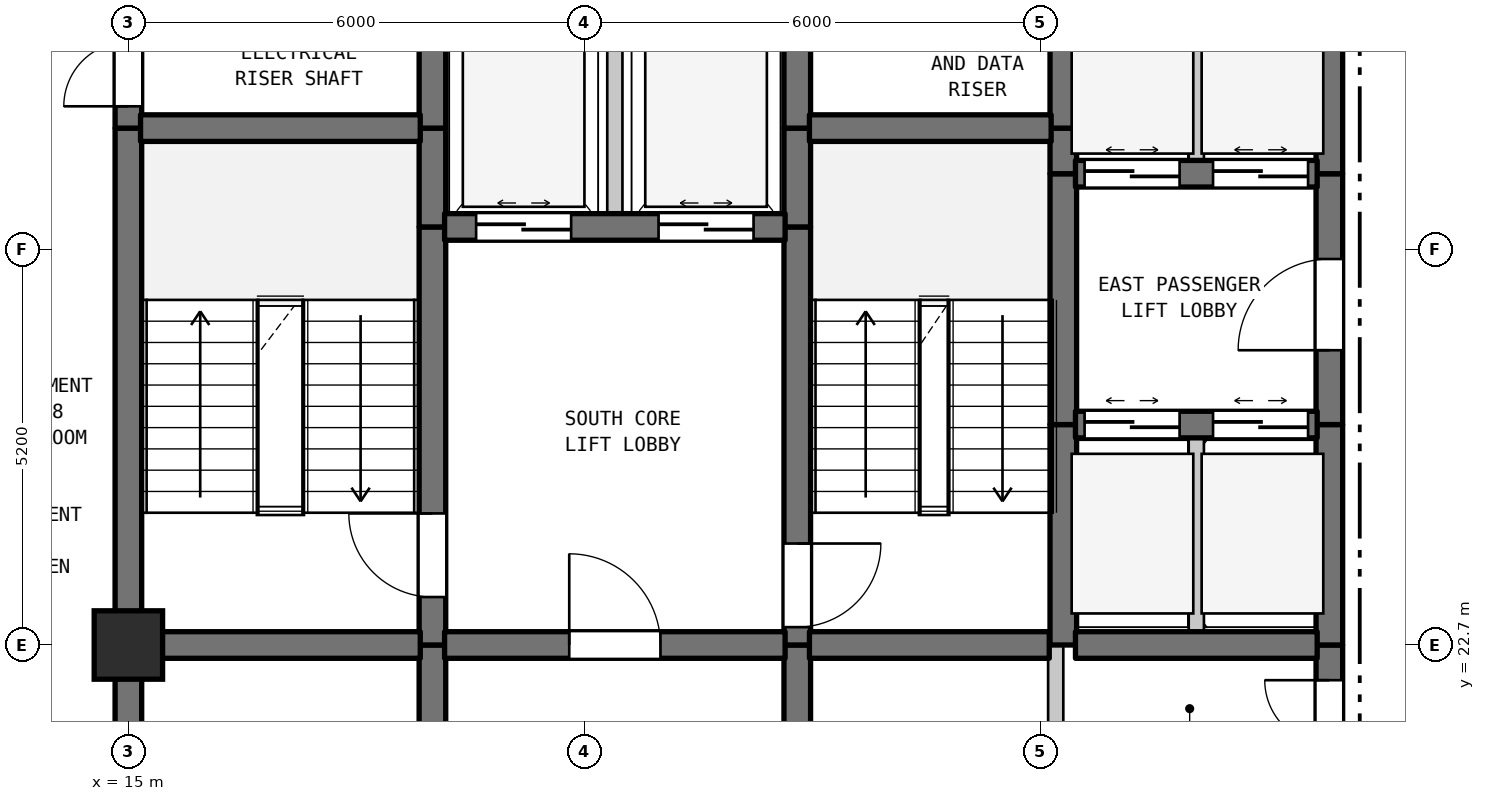
"""IFC4 building model, lengths in metres.
Left out: names, types, materials, properties, quantities, classifications, styles, units other than length and angle.
Written with IfcOpenShell. Run it as: python <this file> out.ifc"""

import sys

from ifc_helpers import new_model, si_unit, direction, frame, frame_2d, origin, origin_2d, place, context, subcontext, project, spatial, rectangle, extrude, element, fill, save


model = new_model("IFC4")
c1 = context("Model", 3, precision=1e-05, world=origin(), true_north=direction((0.0, 1.0)))
c2 = subcontext(c1, "Body", "Model", "MODEL_VIEW")
j1 = project(units=[si_unit("LENGTHUNIT", "METRE"), si_unit("PLANEANGLEUNIT", "RADIAN")], contexts=[c1])
p1 = place(None, origin())
s1 = spatial("IfcSite", under=j1, at=p1, CompositionType="ELEMENT")
p2 = place(p1, origin())
s2 = spatial("IfcBuilding", under=s1, at=p2, CompositionType="ELEMENT")
p3 = place(p2, frame((0.0, 0.0, 195.8)))
s3 = spatial("IfcBuildingStorey", under=s2, at=p3, CompositionType="ELEMENT", Elevation=195.8)
p4 = place(p3, frame((15.0, 22.7, 0.0), z_axis=(0.0, 0.0, 1.0), x_axis=(1.0, 0.0, 0.0)))
e1 = element("IfcColumn", 1, at=p4, inside=s3, PredefinedType="COLUMN", context=c2, shape_type="SweptSolid", body=[
    extrude(rectangle(XDim=0.9, YDim=0.9, at=origin_2d()), origin(), (0.0, 0.0, 1.0), 3.7),
])
p5 = place(p3, frame((15.0, 19.5, 0.0), z_axis=(0.0, 0.0, 1.0), x_axis=(0.0, 1.0, 0.0)))
e2 = element("IfcWall", 2, at=p5, inside=s3, PredefinedType="SHEAR", context=c2, shape_type="SweptSolid", body=[
    extrude(rectangle(XDim=3.2, YDim=0.35, at=frame_2d((1.6, 0.0))), origin(), (0.0, 0.0, 1.0), 3.39),
])
p6 = place(p3, frame((15.0, 22.7, 0.0), z_axis=(0.0, 0.0, 1.0), x_axis=(0.0, 1.0, 0.0)))
e3 = element("IfcWall", 3, at=p6, inside=s3, PredefinedType="SHEAR", context=c2, shape_type="SweptSolid", body=[
    extrude(rectangle(XDim=6.8, YDim=0.35, at=frame_2d((3.4, 0.0))), origin(), (0.0, 0.0, 1.0), 3.39),
])
p7 = place(p3, frame((15.0, 29.5, 0.0), z_axis=(0.0, 0.0, 1.0), x_axis=(0.0, 1.0, 0.0)))
e4 = element("IfcWall", 4, at=p7, inside=s3, PredefinedType="SHEAR", context=c2, shape_type="SweptSolid", body=[
    extrude(rectangle(XDim=1.6, YDim=0.35, at=frame_2d((0.8, 0.0))), origin(), (0.0, 0.0, 1.0), 3.39),
])
p8 = place(p7, frame((0.287, 0.0, 0.0)))
e5 = element("IfcOpeningElement", 5, at=p8, cuts=e4, PredefinedType="OPENING", context=c2, shape_type="SweptSolid", body=[
    extrude(rectangle(XDim=0.85, YDim=2.1, at=frame_2d((0.425, 1.05))), frame((0.0, 0.185, 0.0), z_axis=(0.0, -1.0, 0.0), x_axis=(1.0, 0.0, 0.0)), (0.0, 0.0, 1.0), 0.37),
])
p9 = place(p3, frame((19.0, 19.5, 0.0), z_axis=(0.0, 0.0, 1.0), x_axis=(0.0, 1.0, 0.0)))
e6 = element("IfcWall", 6, at=p9, inside=s3, PredefinedType="SHEAR", context=c2, shape_type="SweptSolid", body=[
    extrude(rectangle(XDim=3.2, YDim=0.35, at=frame_2d((1.6, 0.0))), origin(), (0.0, 0.0, 1.0), 3.39),
])
p10 = place(p3, frame((19.0, 22.7, 0.0), z_axis=(0.0, 0.0, 1.0), x_axis=(0.0, 1.0, 0.0)))
e7 = element("IfcWall", 7, at=p10, inside=s3, PredefinedType="SHEAR", context=c2, shape_type="SweptSolid", body=[
    extrude(rectangle(XDim=5.5, YDim=0.35, at=frame_2d((2.75, 0.0))), origin(), (0.0, 0.0, 1.0), 3.39),
])
p11 = place(p10, frame((0.631, 0.0, 0.0)))
e8 = element("IfcOpeningElement", 8, at=p11, cuts=e7, PredefinedType="OPENING", context=c2, shape_type="SweptSolid", body=[
    extrude(rectangle(XDim=1.1, YDim=2.15, at=frame_2d((0.55, 1.075))), frame((0.0, 0.185, 0.0), z_axis=(0.0, -1.0, 0.0), x_axis=(1.0, 0.0, 0.0)), (0.0, 0.0, 1.0), 0.37),
])
p12 = place(p3, frame((19.0, 28.2, 0.0), z_axis=(0.0, 0.0, 1.0), x_axis=(0.0, 1.0, 0.0)))
e9 = element("IfcWall", 9, at=p12, inside=s3, PredefinedType="SHEAR", context=c2, shape_type="SweptSolid", body=[
    extrude(rectangle(XDim=1.3, YDim=0.35, at=frame_2d((0.65, 0.0))), origin(), (0.0, 0.0, 1.0), 3.39),
])
p13 = place(p3, frame((19.0, 29.5, 0.0), z_axis=(0.0, 0.0, 1.0), x_axis=(0.0, 1.0, 0.0)))
e10 = element("IfcWall", 10, at=p13, inside=s3, PredefinedType="SHEAR", context=c2, shape_type="SweptSolid", body=[
    extrude(rectangle(XDim=5.5, YDim=0.35, at=frame_2d((2.75, 0.0))), origin(), (0.0, 0.0, 1.0), 3.39),
])
p14 = place(p13, frame((2.025, 0.0, 0.0)))
e11 = element("IfcOpeningElement", 11, at=p14, cuts=e10, PredefinedType="OPENING", context=c2, shape_type="SweptSolid", body=[
    extrude(rectangle(XDim=1.1, YDim=2.15, at=frame_2d((0.55, 1.075))), frame((0.0, 0.185, 0.0), z_axis=(0.0, -1.0, 0.0), x_axis=(1.0, 0.0, 0.0)), (0.0, 0.0, 1.0), 0.37),
])
p15 = place(p3, frame((21.4, 28.2, 0.0), z_axis=(0.0, 0.0, 1.0), x_axis=(0.0, 1.0, 0.0)))
e12 = element("IfcWall", 12, at=p15, inside=s3, PredefinedType="STANDARD", context=c2, shape_type="SweptSolid", body=[
    extrude(rectangle(XDim=2.6, YDim=0.2, at=frame_2d((1.3, 0.0))), origin(), (0.0, 0.0, 1.0), 3.39),
])
p16 = place(p3, frame((23.8, 19.5, 0.0), z_axis=(0.0, 0.0, 1.0), x_axis=(0.0, 1.0, 0.0)))
e13 = element("IfcWall", 13, at=p16, inside=s3, PredefinedType="SHEAR", context=c2, shape_type="SweptSolid", body=[
    extrude(rectangle(XDim=3.2, YDim=0.35, at=frame_2d((1.6, 0.0))), origin(), (0.0, 0.0, 1.0), 3.39),
])
p17 = place(p3, frame((23.8, 22.7, 0.0), z_axis=(0.0, 0.0, 1.0), x_axis=(0.0, 1.0, 0.0)))
e14 = element("IfcWall", 14, at=p17, inside=s3, PredefinedType="SHEAR", context=c2, shape_type="SweptSolid", body=[
    extrude(rectangle(XDim=5.5, YDim=0.35, at=frame_2d((2.75, 0.0))), origin(), (0.0, 0.0, 1.0), 3.39),
])
p18 = place(p17, frame((0.235, 0.0, 0.0)))
e15 = element("IfcOpeningElement", 15, at=p18, cuts=e14, PredefinedType="OPENING", context=c2, shape_type="SweptSolid", body=[
    extrude(rectangle(XDim=1.1, YDim=2.15, at=frame_2d((0.55, 1.075))), frame((0.0, 0.185, 0.0), z_axis=(0.0, -1.0, 0.0), x_axis=(1.0, 0.0, 0.0)), (0.0, 0.0, 1.0), 0.37),
])
for number, where, z_axis, x_axis in (
    (16, (23.8, 28.2, 0.0), (0.0, 0.0, 1.0), (0.0, 1.0, 0.0)),
    (17, (23.8, 29.5, 0.0), (0.0, 0.0, 1.0), (0.0, 1.0, 0.0)),
):
    element("IfcWall", number, at=place(p3, frame(where, z_axis=z_axis, x_axis=x_axis)), inside=s3, PredefinedType="SHEAR", context=c2, shape_type="SweptSolid", body=[
        extrude(rectangle(XDim=1.3, YDim=0.35, at=frame_2d((0.65, 0.0))), origin(), (0.0, 0.0, 1.0), 3.39),
    ])
p19 = place(p3, frame((27.2, 21.1, 0.0), z_axis=(0.0, 0.0, 1.0), x_axis=(0.0, 1.0, 0.0)))
e18 = element("IfcWall", 18, at=p19, inside=s3, PredefinedType="STANDARD", context=c2, shape_type="SweptSolid", body=[
    extrude(rectangle(XDim=1.6, YDim=0.2, at=frame_2d((0.8, 0.0))), origin(), (0.0, 0.0, 1.0), 3.39),
])
p20 = place(p3, frame((27.3, 22.7, 0.0), z_axis=(0.0, 0.0, 1.0), x_axis=(0.0, 1.0, 0.0)))
e19 = element("IfcWall", 19, at=p20, inside=s3, PredefinedType="SHEAR", context=c2, shape_type="SweptSolid", body=[
    extrude(rectangle(XDim=2.9, YDim=0.35, at=frame_2d((1.45, 0.0))), origin(), (0.0, 0.0, 1.0), 3.39),
])
p21 = place(p3, frame((27.3, 25.6, 0.0), z_axis=(0.0, 0.0, 1.0), x_axis=(0.0, 1.0, 0.0)))
e20 = element("IfcWall", 20, at=p21, inside=s3, PredefinedType="SHEAR", context=c2, shape_type="SweptSolid", body=[
    extrude(rectangle(XDim=3.3, YDim=0.35, at=frame_2d((1.65, 0.0))), origin(), (0.0, 0.0, 1.0), 3.39),
])
p22 = place(p3, frame((27.3, 28.9, 0.0), z_axis=(0.0, 0.0, 1.0), x_axis=(0.0, 1.0, 0.0)))
e21 = element("IfcWall", 21, at=p22, inside=s3, PredefinedType="SHEAR", context=c2, shape_type="SweptSolid", body=[
    extrude(rectangle(XDim=0.6, YDim=0.35, at=frame_2d((0.3, 0.0))), origin(), (0.0, 0.0, 1.0), 3.39),
])
p23 = place(p3, frame((27.3, 29.5, 0.0), z_axis=(0.0, 0.0, 1.0), x_axis=(0.0, 1.0, 0.0)))
e22 = element("IfcWall", 22, at=p23, inside=s3, PredefinedType="SHEAR", context=c2, shape_type="SweptSolid", body=[
    extrude(rectangle(XDim=2.0, YDim=0.35, at=frame_2d((1.0, 0.0))), origin(), (0.0, 0.0, 1.0), 3.39),
])
p24 = place(p3, frame((29.05, 22.7, 0.0), z_axis=(0.0, 0.0, 1.0), x_axis=(0.0, 1.0, 0.0)))
e23 = element("IfcWall", 23, at=p24, inside=s3, PredefinedType="STANDARD", context=c2, shape_type="SweptSolid", body=[
    extrude(rectangle(XDim=2.9, YDim=0.2, at=frame_2d((1.45, 0.0))), origin(), (0.0, 0.0, 1.0), 3.39),
])
p25 = place(p3, frame((29.05, 28.9, 0.0), z_axis=(0.0, 0.0, 1.0), x_axis=(0.0, 1.0, 0.0)))
e24 = element("IfcWall", 24, at=p25, inside=s3, PredefinedType="STANDARD", context=c2, shape_type="SweptSolid", body=[
    extrude(rectangle(XDim=2.6, YDim=0.2, at=frame_2d((1.3, 0.0))), origin(), (0.0, 0.0, 1.0), 3.39),
])
p26 = place(p3, frame((30.8, 21.1, 0.0), z_axis=(0.0, 0.0, 1.0), x_axis=(0.0, 1.0, 0.0)))
e25 = element("IfcWall", 25, at=p26, inside=s3, PredefinedType="SHEAR", context=c2, shape_type="SweptSolid", body=[
    extrude(rectangle(XDim=1.6, YDim=0.35, at=frame_2d((0.8, 0.0))), origin(), (0.0, 0.0, 1.0), 3.39),
])
p27 = place(p26, frame((0.287, 0.0, 0.0)))
e26 = element("IfcOpeningElement", 26, at=p27, cuts=e25, PredefinedType="OPENING", context=c2, shape_type="SweptSolid", body=[
    extrude(rectangle(XDim=0.85, YDim=2.1, at=frame_2d((0.425, 1.05))), frame((0.0, 0.185, 0.0), z_axis=(0.0, -1.0, 0.0), x_axis=(1.0, 0.0, 0.0)), (0.0, 0.0, 1.0), 0.37),
])
p28 = place(p3, frame((30.8, 22.7, 0.0), z_axis=(0.0, 0.0, 1.0), x_axis=(0.0, 1.0, 0.0)))
e27 = element("IfcWall", 27, at=p28, inside=s3, PredefinedType="SHEAR", context=c2, shape_type="SweptSolid", body=[
    extrude(rectangle(XDim=2.9, YDim=0.35, at=frame_2d((1.45, 0.0))), origin(), (0.0, 0.0, 1.0), 3.39),
])
p29 = place(p3, frame((30.8, 25.6, 0.0), z_axis=(0.0, 0.0, 1.0), x_axis=(0.0, 1.0, 0.0)))
e28 = element("IfcWall", 28, at=p29, inside=s3, PredefinedType="SHEAR", context=c2, shape_type="SweptSolid", body=[
    extrude(rectangle(XDim=3.3, YDim=0.35, at=frame_2d((1.65, 0.0))), origin(), (0.0, 0.0, 1.0), 3.39),
])
p30 = place(p29, frame((0.978, 0.0, 0.0)))
e29 = element("IfcOpeningElement", 29, at=p30, cuts=e28, PredefinedType="OPENING", context=c2, shape_type="SweptSolid", body=[
    extrude(rectangle(XDim=1.2, YDim=2.2, at=frame_2d((0.6, 1.1))), frame((0.0, 0.185, 0.0), z_axis=(0.0, -1.0, 0.0), x_axis=(1.0, 0.0, 0.0)), (0.0, 0.0, 1.0), 0.37),
])
p31 = place(p3, frame((30.8, 28.9, 0.0), z_axis=(0.0, 0.0, 1.0), x_axis=(0.0, 1.0, 0.0)))
e30 = element("IfcWall", 30, at=p31, inside=s3, PredefinedType="SHEAR", context=c2, shape_type="SweptSolid", body=[
    extrude(rectangle(XDim=2.6, YDim=0.35, at=frame_2d((1.3, 0.0))), origin(), (0.0, 0.0, 1.0), 3.39),
])
p32 = place(p3, frame((15.16, 22.7, 0.0), z_axis=(0.0, 0.0, 1.0), x_axis=(1.0, 0.0, 0.0)))
e31 = element("IfcWall", 31, at=p32, inside=s3, PredefinedType="SHEAR", context=c2, shape_type="SweptSolid", body=[
    extrude(rectangle(XDim=3.68, YDim=0.35, at=frame_2d((1.84, 0.0))), origin(), (0.0, 0.0, 1.0), 3.39),
])
p33 = place(p3, frame((19.16, 22.7, 0.0), z_axis=(0.0, 0.0, 1.0), x_axis=(1.0, 0.0, 0.0)))
e32 = element("IfcWall", 32, at=p33, inside=s3, PredefinedType="SHEAR", context=c2, shape_type="SweptSolid", body=[
    extrude(rectangle(XDim=4.48, YDim=0.35, at=frame_2d((2.24, 0.0))), origin(), (0.0, 0.0, 1.0), 3.39),
])
p34 = place(p33, frame((1.64, 0.0, 0.0)))
e33 = element("IfcOpeningElement", 33, at=p34, cuts=e32, PredefinedType="OPENING", context=c2, shape_type="SweptSolid", body=[
    extrude(rectangle(XDim=1.2, YDim=2.2, at=frame_2d((0.6, 1.1))), frame((0.0, 0.185, 0.0), z_axis=(0.0, -1.0, 0.0), x_axis=(1.0, 0.0, 0.0)), (0.0, 0.0, 1.0), 0.37),
])
p35 = place(p3, frame((23.96, 22.7, 0.0), z_axis=(0.0, 0.0, 1.0), x_axis=(1.0, 0.0, 0.0)))
e34 = element("IfcWall", 34, at=p35, inside=s3, PredefinedType="SHEAR", context=c2, shape_type="SweptSolid", body=[
    extrude(rectangle(XDim=3.155, YDim=0.35, at=frame_2d((1.578, 0.0))), origin(), (0.0, 0.0, 1.0), 3.39),
])
p36 = place(p3, frame((27.46, 22.7, 0.0), z_axis=(0.0, 0.0, 1.0), x_axis=(1.0, 0.0, 0.0)))
e35 = element("IfcWall", 35, at=p36, inside=s3, PredefinedType="SHEAR", context=c2, shape_type="SweptSolid", body=[
    extrude(rectangle(XDim=3.18, YDim=0.35, at=frame_2d((1.59, 0.0))), origin(), (0.0, 0.0, 1.0), 3.39),
])
p37 = place(p3, frame((27.46, 25.6, 0.0), z_axis=(0.0, 0.0, 1.0), x_axis=(1.0, 0.0, 0.0)))
e36 = element("IfcWall", 36, at=p37, inside=s3, PredefinedType="SHEAR", context=c2, shape_type="SweptSolid", body=[
    extrude(rectangle(XDim=3.18, YDim=0.35, at=frame_2d((1.59, 0.0))), origin(), (0.0, 0.0, 1.0), 3.39),
])
p38 = place(p37, frame((0.12, 0.0, 0.0)))
e37 = element("IfcOpeningElement", 37, at=p38, cuts=e36, PredefinedType="OPENING", context=c2, shape_type="SweptSolid", body=[
    extrude(rectangle(XDim=1.25, YDim=2.2, at=frame_2d((0.625, 1.1))), frame((0.0, 0.185, 0.0), z_axis=(0.0, -1.0, 0.0), x_axis=(1.0, 0.0, 0.0)), (0.0, 0.0, 1.0), 0.37),
])
p39 = place(p37, frame((1.81, 0.0, 0.0)))
e38 = element("IfcOpeningElement", 38, at=p39, cuts=e36, PredefinedType="OPENING", context=c2, shape_type="SweptSolid", body=[
    extrude(rectangle(XDim=1.25, YDim=2.2, at=frame_2d((0.625, 1.1))), frame((0.0, 0.185, 0.0), z_axis=(0.0, -1.0, 0.0), x_axis=(1.0, 0.0, 0.0)), (0.0, 0.0, 1.0), 0.37),
])
p40 = place(p3, frame((19.16, 28.2, 0.0), z_axis=(0.0, 0.0, 1.0), x_axis=(1.0, 0.0, 0.0)))
e39 = element("IfcWall", 39, at=p40, inside=s3, PredefinedType="SHEAR", context=c2, shape_type="SweptSolid", body=[
    extrude(rectangle(XDim=4.48, YDim=0.35, at=frame_2d((2.24, 0.0))), origin(), (0.0, 0.0, 1.0), 3.39),
])
p41 = place(p40, frame((0.415, 0.0, 0.0)))
e40 = element("IfcOpeningElement", 40, at=p41, cuts=e39, PredefinedType="OPENING", context=c2, shape_type="SweptSolid", body=[
    extrude(rectangle(XDim=1.25, YDim=2.2, at=frame_2d((0.625, 1.1))), frame((0.0, 0.185, 0.0), z_axis=(0.0, -1.0, 0.0), x_axis=(1.0, 0.0, 0.0)), (0.0, 0.0, 1.0), 0.37),
])
p42 = place(p40, frame((2.815, 0.0, 0.0)))
e41 = element("IfcOpeningElement", 41, at=p42, cuts=e39, PredefinedType="OPENING", context=c2, shape_type="SweptSolid", body=[
    extrude(rectangle(XDim=1.25, YDim=2.2, at=frame_2d((0.625, 1.1))), frame((0.0, 0.185, 0.0), z_axis=(0.0, -1.0, 0.0), x_axis=(1.0, 0.0, 0.0)), (0.0, 0.0, 1.0), 0.37),
])
p43 = place(p3, frame((27.46, 28.9, 0.0), z_axis=(0.0, 0.0, 1.0), x_axis=(1.0, 0.0, 0.0)))
e42 = element("IfcWall", 42, at=p43, inside=s3, PredefinedType="SHEAR", context=c2, shape_type="SweptSolid", body=[
    extrude(rectangle(XDim=3.18, YDim=0.35, at=frame_2d((1.59, 0.0))), origin(), (0.0, 0.0, 1.0), 3.39),
])
p44 = place(p43, frame((0.12, 0.0, 0.0)))
e43 = element("IfcOpeningElement", 43, at=p44, cuts=e42, PredefinedType="OPENING", context=c2, shape_type="SweptSolid", body=[
    extrude(rectangle(XDim=1.25, YDim=2.2, at=frame_2d((0.625, 1.1))), frame((0.0, 0.185, 0.0), z_axis=(0.0, -1.0, 0.0), x_axis=(1.0, 0.0, 0.0)), (0.0, 0.0, 1.0), 0.37),
])
p45 = place(p43, frame((1.81, 0.0, 0.0)))
e44 = element("IfcOpeningElement", 44, at=p45, cuts=e42, PredefinedType="OPENING", context=c2, shape_type="SweptSolid", body=[
    extrude(rectangle(XDim=1.25, YDim=2.2, at=frame_2d((0.625, 1.1))), frame((0.0, 0.185, 0.0), z_axis=(0.0, -1.0, 0.0), x_axis=(1.0, 0.0, 0.0)), (0.0, 0.0, 1.0), 0.37),
])
p46 = place(p3, frame((15.16, 29.5, 0.0), z_axis=(0.0, 0.0, 1.0), x_axis=(1.0, 0.0, 0.0)))
e45 = element("IfcWall", 45, at=p46, inside=s3, PredefinedType="SHEAR", context=c2, shape_type="SweptSolid", body=[
    extrude(rectangle(XDim=3.68, YDim=0.35, at=frame_2d((1.84, 0.0))), origin(), (0.0, 0.0, 1.0), 3.39),
])
p47 = place(p3, frame((23.96, 29.5, 0.0), z_axis=(0.0, 0.0, 1.0), x_axis=(1.0, 0.0, 0.0)))
e46 = element("IfcWall", 46, at=p47, inside=s3, PredefinedType="SHEAR", context=c2, shape_type="SweptSolid", body=[
    extrude(rectangle(XDim=3.18, YDim=0.35, at=frame_2d((1.59, 0.0))), origin(), (0.0, 0.0, 1.0), 3.39),
])
p48 = place(p8, origin())
e47 = element("IfcDoor", 47, at=p48, inside=s3, OperationType="SINGLE_SWING_LEFT", PredefinedType="DOOR", context=c2, shape_type="SweptSolid", body=[
    extrude(rectangle(XDim=0.85, YDim=2.1, at=frame_2d((0.425, 1.05))), frame((0.0, 0.025, 0.0), z_axis=(0.0, -1.0, 0.0), x_axis=(1.0, 0.0, 0.0)), (0.0, 0.0, 1.0), 0.05),
])
fill(e5, e47)
p49 = place(p11, origin())
e48 = element("IfcDoor", 48, at=p49, inside=s3, OperationType="SINGLE_SWING_RIGHT", PredefinedType="DOOR", context=c2, shape_type="SweptSolid", body=[
    extrude(rectangle(XDim=1.1, YDim=2.15, at=frame_2d((0.55, 1.075))), frame((0.0, 0.025, 0.0), z_axis=(0.0, -1.0, 0.0), x_axis=(1.0, 0.0, 0.0)), (0.0, 0.0, 1.0), 0.05),
])
fill(e8, e48)
p50 = place(p18, frame((1.1, 0.0, 0.0), z_axis=(0.0, 0.0, 1.0), x_axis=(-1.0, 0.0, 0.0)))
e49 = element("IfcDoor", 49, at=p50, inside=s3, OperationType="SINGLE_SWING_RIGHT", PredefinedType="DOOR", context=c2, shape_type="SweptSolid", body=[
    extrude(rectangle(XDim=1.1, YDim=2.15, at=frame_2d((0.55, 1.075))), frame((0.0, 0.025, 0.0), z_axis=(0.0, -1.0, 0.0), x_axis=(1.0, 0.0, 0.0)), (0.0, 0.0, 1.0), 0.05),
])
fill(e15, e49)
p51 = place(p27, origin())
e50 = element("IfcDoor", 50, at=p51, inside=s3, OperationType="SINGLE_SWING_RIGHT", PredefinedType="DOOR", context=c2, shape_type="SweptSolid", body=[
    extrude(rectangle(XDim=0.85, YDim=2.1, at=frame_2d((0.425, 1.05))), frame((0.0, 0.025, 0.0), z_axis=(0.0, -1.0, 0.0), x_axis=(1.0, 0.0, 0.0)), (0.0, 0.0, 1.0), 0.05),
])
fill(e26, e50)
p52 = place(p30, origin())
e51 = element("IfcDoor", 51, at=p52, inside=s3, OperationType="SINGLE_SWING_LEFT", PredefinedType="DOOR", context=c2, shape_type="SweptSolid", body=[
    extrude(rectangle(XDim=1.2, YDim=2.2, at=frame_2d((0.6, 1.1))), frame((0.0, 0.025, 0.0), z_axis=(0.0, -1.0, 0.0), x_axis=(1.0, 0.0, 0.0)), (0.0, 0.0, 1.0), 0.05),
])
fill(e29, e51)
p53 = place(p34, origin())
e52 = element("IfcDoor", 52, at=p53, inside=s3, OperationType="SINGLE_SWING_LEFT", PredefinedType="DOOR", context=c2, shape_type="SweptSolid", body=[
    extrude(rectangle(XDim=1.2, YDim=2.2, at=frame_2d((0.6, 1.1))), frame((0.0, 0.025, 0.0), z_axis=(0.0, -1.0, 0.0), x_axis=(1.0, 0.0, 0.0)), (0.0, 0.0, 1.0), 0.05),
])
fill(e33, e52)
p54 = place(p38, origin())
e53 = element("IfcDoor", 53, at=p54, inside=s3, OperationType="DOUBLE_DOOR_SLIDING", PredefinedType="DOOR", context=c2, shape_type="SweptSolid", body=[
    extrude(rectangle(XDim=1.25, YDim=2.2, at=frame_2d((0.625, 1.1))), frame((0.0, 0.025, 0.0), z_axis=(0.0, -1.0, 0.0), x_axis=(1.0, 0.0, 0.0)), (0.0, 0.0, 1.0), 0.05),
])
fill(e37, e53)
p55 = place(p39, origin())
e54 = element("IfcDoor", 54, at=p55, inside=s3, OperationType="DOUBLE_DOOR_SLIDING", PredefinedType="DOOR", context=c2, shape_type="SweptSolid", body=[
    extrude(rectangle(XDim=1.25, YDim=2.2, at=frame_2d((0.625, 1.1))), frame((0.0, 0.025, 0.0), z_axis=(0.0, -1.0, 0.0), x_axis=(1.0, 0.0, 0.0)), (0.0, 0.0, 1.0), 0.05),
])
fill(e38, e54)
p56 = place(p41, origin())
e55 = element("IfcDoor", 55, at=p56, inside=s3, OperationType="DOUBLE_DOOR_SLIDING", PredefinedType="DOOR", context=c2, shape_type="SweptSolid", body=[
    extrude(rectangle(XDim=1.25, YDim=2.2, at=frame_2d((0.625, 1.1))), frame((0.0, 0.025, 0.0), z_axis=(0.0, -1.0, 0.0), x_axis=(1.0, 0.0, 0.0)), (0.0, 0.0, 1.0), 0.05),
])
fill(e40, e55)
p57 = place(p42, origin())
e56 = element("IfcDoor", 56, at=p57, inside=s3, OperationType="DOUBLE_DOOR_SLIDING", PredefinedType="DOOR", context=c2, shape_type="SweptSolid", body=[
    extrude(rectangle(XDim=1.25, YDim=2.2, at=frame_2d((0.625, 1.1))), frame((0.0, 0.025, 0.0), z_axis=(0.0, -1.0, 0.0), x_axis=(1.0, 0.0, 0.0)), (0.0, 0.0, 1.0), 0.05),
])
fill(e41, e56)
p58 = place(p44, origin())
e57 = element("IfcDoor", 57, at=p58, inside=s3, OperationType="DOUBLE_DOOR_SLIDING", PredefinedType="DOOR", context=c2, shape_type="SweptSolid", body=[
    extrude(rectangle(XDim=1.25, YDim=2.2, at=frame_2d((0.625, 1.1))), frame((0.0, 0.025, 0.0), z_axis=(0.0, -1.0, 0.0), x_axis=(1.0, 0.0, 0.0)), (0.0, 0.0, 1.0), 0.05),
])
fill(e43, e57)
p59 = place(p45, origin())
e58 = element("IfcDoor", 58, at=p59, inside=s3, OperationType="DOUBLE_DOOR_SLIDING", PredefinedType="DOOR", context=c2, shape_type="SweptSolid", body=[
    extrude(rectangle(XDim=1.25, YDim=2.2, at=frame_2d((0.625, 1.1))), frame((0.0, 0.025, 0.0), z_axis=(0.0, -1.0, 0.0), x_axis=(1.0, 0.0, 0.0)), (0.0, 0.0, 1.0), 0.05),
])
fill(e44, e58)
save(model, sys.argv[1])
